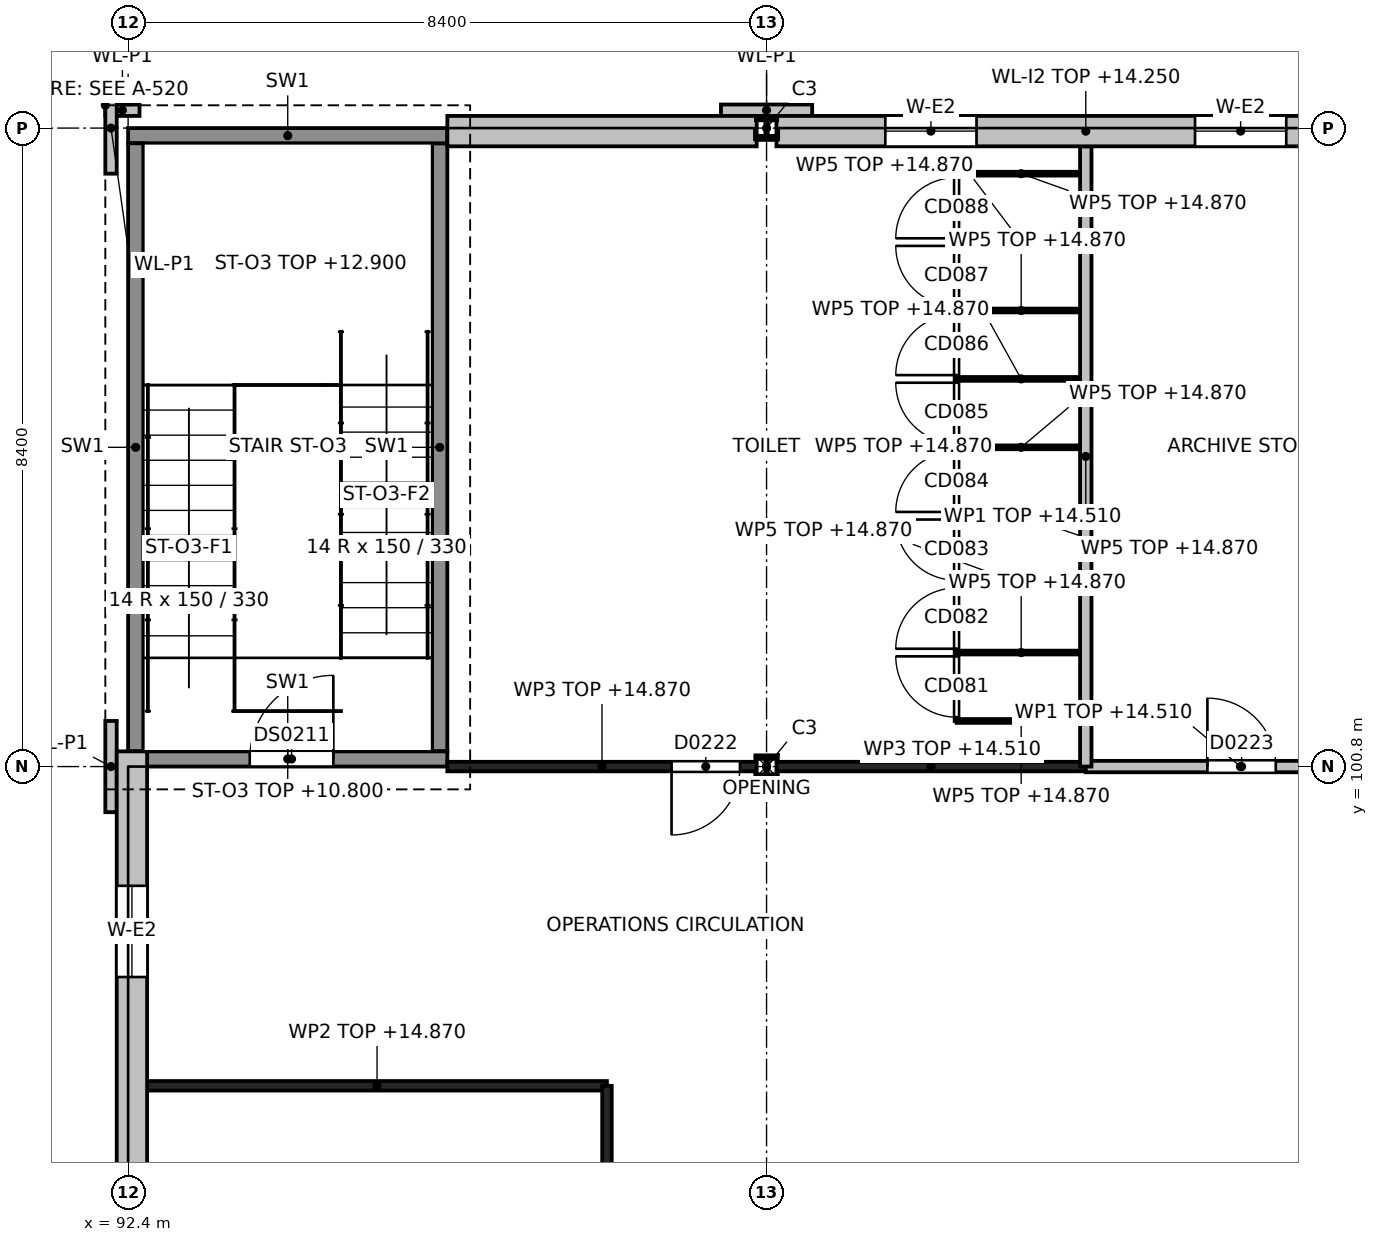
"""IFC4 building model, lengths in metres.
Left out: names, types, materials, properties, quantities, classifications, styles, units other than length and angle.
Written with IfcOpenShell. Run it as: python <this file> out.ifc"""

import sys

from ifc_helpers import new_model, si_unit, direction, frame, frame_2d, origin, origin_2d, place, context, subcontext, project, spatial, rectangle, i_section, extrude, element, fill, save


model = new_model("IFC4")
c1 = context("Model", 3, precision=1e-05, world=origin(), true_north=direction((0.0, 1.0)))
c2 = subcontext(c1, "Body", "Model", "MODEL_VIEW")
j1 = project(units=[si_unit("LENGTHUNIT", "METRE"), si_unit("PLANEANGLEUNIT", "RADIAN")], contexts=[c1])
p1 = place(None, origin())
s1 = spatial("IfcSite", under=j1, at=p1, CompositionType="ELEMENT")
p2 = place(p1, origin())
s2 = spatial("IfcBuilding", under=s1, at=p2, CompositionType="ELEMENT")
p3 = place(p2, frame((0.0, 0.0, 10.8)))
s3 = spatial("IfcBuildingStorey", under=s2, at=p3, CompositionType="ELEMENT", Elevation=10.8)
for number, where, z_axis, x_axis in (
    (1, (100.8, 100.8, 0.0), (0.0, 0.0, 1.0), (1.0, 0.0, 0.0)),
    (2, (100.8, 109.2, 0.0), (0.0, 0.0, 1.0), (1.0, 0.0, 0.0)),
):
    element("IfcColumn", number, at=place(p3, frame(where, z_axis=z_axis, x_axis=x_axis)), inside=s3, PredefinedType="COLUMN", context=c2, shape_type="SweptSolid", body=[
        extrude(i_section(OverallWidth=0.26, OverallDepth=0.26, WebThickness=0.01, FlangeThickness=0.018, at=origin_2d()), origin(), (0.0, 0.0, 1.0), 4.2),
    ])
p4 = place(p3, frame((92.4, 100.9, 0.0), z_axis=(0.0, 0.0, 1.0), x_axis=(1.0, 0.0, 0.0)))
e3 = element("IfcWall", 3, at=p4, inside=s3, PredefinedType="SHEAR", context=c2, shape_type="SweptSolid", body=[
    extrude(rectangle(XDim=4.2, YDim=0.2, at=frame_2d((2.1, 0.0))), origin(), (0.0, 0.0, 1.0), 4.2),
])
p5 = place(p4, frame((1.6, 0.0, 0.0)))
e4 = element("IfcOpeningElement", 4, at=p5, cuts=e3, PredefinedType="OPENING", context=c2, shape_type="SweptSolid", body=[
    extrude(rectangle(XDim=1.1, YDim=2.1, at=frame_2d((0.55, 1.05))), frame((0.0, 0.1, 0.0), z_axis=(0.0, -1.0, 0.0), x_axis=(1.0, 0.0, 0.0)), (0.0, 0.0, 1.0), 0.2),
])
p6 = place(p3, frame((92.4, 109.1, 0.0), z_axis=(0.0, 0.0, 1.0), x_axis=(1.0, 0.0, 0.0)))
e5 = element("IfcWall", 5, at=p6, inside=s3, PredefinedType="SHEAR", context=c2, shape_type="SweptSolid", body=[
    extrude(rectangle(XDim=4.2, YDim=0.2, at=frame_2d((2.1, 0.0))), origin(), (0.0, 0.0, 1.0), 4.2),
])
for number, where, z_axis, x_axis in (
    (6, (92.5, 101.0, 0.0), (0.0, 0.0, 1.0), (0.0, 1.0, 0.0)),
    (7, (96.5, 101.0, 0.0), (0.0, 0.0, 1.0), (0.0, 1.0, 0.0)),
):
    element("IfcWall", number, at=place(p3, frame(where, z_axis=z_axis, x_axis=x_axis)), inside=s3, PredefinedType="SHEAR", context=c2, shape_type="SweptSolid", body=[
        extrude(rectangle(XDim=8.0, YDim=0.2, at=frame_2d((4.0, 0.0))), origin(), (0.0, 0.0, 1.0), 4.2),
    ])
p7 = place(p3, frame((96.6, 109.16, 0.0), z_axis=(0.0, 0.0, 1.0), x_axis=(1.0, 0.0, 0.0)))
e8 = element("IfcWall", 8, at=p7, inside=s3, PredefinedType="SOLIDWALL", context=c2, shape_type="SweptSolid", body=[
    extrude(rectangle(XDim=4.07, YDim=0.4, at=frame_2d((2.035, 0.0))), origin(), (0.0, 0.0, 1.0), 3.45),
])
p8 = place(p3, frame((100.93, 109.16, 0.0), z_axis=(0.0, 0.0, 1.0), x_axis=(1.0, 0.0, 0.0)))
e9 = element("IfcWall", 9, at=p8, inside=s3, PredefinedType="SOLIDWALL", context=c2, shape_type="SweptSolid", body=[
    extrude(rectangle(XDim=8.14, YDim=0.4, at=frame_2d((4.07, 0.0))), origin(), (0.0, 0.0, 1.0), 3.45),
])
p9 = place(p8, frame((1.433, 0.0, 0.9)))
e10 = element("IfcOpeningElement", 10, at=p9, cuts=e9, PredefinedType="OPENING", context=c2, shape_type="SweptSolid", body=[
    extrude(rectangle(XDim=1.2, YDim=2.4, at=frame_2d((0.6, 1.2))), frame((0.0, 0.2, 0.0), z_axis=(0.0, -1.0, 0.0), x_axis=(1.0, 0.0, 0.0)), (0.0, 0.0, 1.0), 0.4),
])
p10 = place(p8, frame((5.508, 0.0, 0.9)))
e11 = element("IfcOpeningElement", 11, at=p10, cuts=e9, PredefinedType="OPENING", context=c2, shape_type="SweptSolid", body=[
    extrude(rectangle(XDim=1.2, YDim=2.4, at=frame_2d((0.6, 1.2))), frame((0.0, 0.2, 0.0), z_axis=(0.0, -1.0, 0.0), x_axis=(1.0, 0.0, 0.0)), (0.0, 0.0, 1.0), 0.4),
])
p11 = place(p3, frame((92.1, 109.435, 0.0), z_axis=(0.0, 0.0, 1.0), x_axis=(1.0, 0.0, 0.0)))
e12 = element("IfcWall", 12, at=p11, inside=s3, PredefinedType="SOLIDWALL", context=c2, shape_type="SweptSolid", body=[
    extrude(rectangle(XDim=0.45, YDim=0.15, at=frame_2d((0.225, 0.0))), origin(), (0.0, 0.0, 1.0), 4.2),
])
p12 = place(p3, frame((100.2, 109.435, 0.0), z_axis=(0.0, 0.0, 1.0), x_axis=(1.0, 0.0, 0.0)))
e13 = element("IfcWall", 13, at=p12, inside=s3, PredefinedType="SOLIDWALL", context=c2, shape_type="SweptSolid", body=[
    extrude(rectangle(XDim=1.2, YDim=0.15, at=frame_2d((0.6, 0.0))), origin(), (0.0, 0.0, 1.0), 4.2),
])
p13 = place(p3, frame((92.45, 92.53, 0.0), z_axis=(0.0, 0.0, 1.0), x_axis=(0.0, 1.0, 0.0)))
e14 = element("IfcWall", 14, at=p13, inside=s3, PredefinedType="SOLIDWALL", context=c2, shape_type="SweptSolid", body=[
    extrude(rectangle(XDim=8.47, YDim=0.4, at=frame_2d((4.235, 0.0))), origin(), (0.0, 0.0, 1.0), 3.45),
])
p14 = place(p13, frame((1.439, 0.0, 0.9)))
e15 = element("IfcOpeningElement", 15, at=p14, cuts=e14, PredefinedType="OPENING", context=c2, shape_type="SweptSolid", body=[
    extrude(rectangle(XDim=1.2, YDim=2.4, at=frame_2d((0.6, 1.2))), frame((0.0, 0.2, 0.0), z_axis=(0.0, -1.0, 0.0), x_axis=(1.0, 0.0, 0.0)), (0.0, 0.0, 1.0), 0.4),
])
p15 = place(p13, frame((5.501, 0.0, 0.9)))
e16 = element("IfcOpeningElement", 16, at=p15, cuts=e14, PredefinedType="OPENING", context=c2, shape_type="SweptSolid", body=[
    extrude(rectangle(XDim=1.2, YDim=2.4, at=frame_2d((0.6, 1.2))), frame((0.0, 0.2, 0.0), z_axis=(0.0, -1.0, 0.0), x_axis=(1.0, 0.0, 0.0)), (0.0, 0.0, 1.0), 0.4),
])
for number, where, z_axis, x_axis in (
    (17, (92.175, 100.2, 0.0), (0.0, 0.0, 1.0), (0.0, 1.0, 0.0)),
    (18, (92.175, 108.6, 0.0), (0.0, 0.0, 1.0), (0.0, 1.0, 0.0)),
):
    element("IfcWall", number, at=place(p3, frame(where, z_axis=z_axis, x_axis=x_axis)), inside=s3, PredefinedType="SOLIDWALL", context=c2, shape_type="SweptSolid", body=[
        extrude(rectangle(XDim=1.2, YDim=0.15, at=frame_2d((0.6, 0.0))), origin(), (0.0, 0.0, 1.0), 4.2),
    ])
p16 = place(p3, frame((92.65, 96.6, 0.0), z_axis=(0.0, 0.0, 1.0), x_axis=(1.0, 0.0, 0.0)))
e19 = element("IfcWall", 19, at=p16, inside=s3, PredefinedType="PARTITIONING", context=c2, shape_type="SweptSolid", body=[
    extrude(rectangle(XDim=6.05, YDim=0.125, at=frame_2d((3.025, 0.0))), origin(), (0.0, 0.0, 1.0), 4.07),
])
p17 = place(p3, frame((96.6, 100.8, 0.0), z_axis=(0.0, 0.0, 1.0), x_axis=(1.0, 0.0, 0.0)))
e20 = element("IfcWall", 20, at=p17, inside=s3, PredefinedType="PARTITIONING", context=c2, shape_type="SweptSolid", body=[
    extrude(rectangle(XDim=4.07, YDim=0.125, at=frame_2d((2.035, 0.0))), origin(), (0.0, 0.0, 1.0), 4.07),
])
p18 = place(p17, frame((2.95, 0.0, 0.0)))
e21 = element("IfcOpeningElement", 21, at=p18, cuts=e20, PredefinedType="OPENING", context=c2, shape_type="SweptSolid", body=[
    extrude(rectangle(XDim=0.9, YDim=2.1, at=frame_2d((0.45, 1.05))), frame((0.0, 0.062, 0.0), z_axis=(0.0, -1.0, 0.0), x_axis=(1.0, 0.0, 0.0)), (0.0, 0.0, 1.0), 0.125),
])
p19 = place(p3, frame((100.93, 100.8, 0.0), z_axis=(0.0, 0.0, 1.0), x_axis=(1.0, 0.0, 0.0)))
e22 = element("IfcWall", 22, at=p19, inside=s3, PredefinedType="PARTITIONING", context=c2, shape_type="SweptSolid", body=[
    extrude(rectangle(XDim=4.07, YDim=0.125, at=frame_2d((2.035, 0.0))), origin(), (0.0, 0.0, 1.0), 3.71),
])
p20 = place(p3, frame((105.0, 100.8, 0.0), z_axis=(0.0, 0.0, 1.0), x_axis=(1.0, 0.0, 0.0)))
e23 = element("IfcWall", 23, at=p20, inside=s3, PredefinedType="PARTITIONING", context=c2, shape_type="SweptSolid", body=[
    extrude(rectangle(XDim=4.07, YDim=0.15, at=frame_2d((2.035, 0.0))), origin(), (0.0, 0.0, 1.0), 3.71),
])
p21 = place(p20, frame((1.6, 0.0, 0.0)))
e24 = element("IfcOpeningElement", 24, at=p21, cuts=e23, PredefinedType="OPENING", context=c2, shape_type="SweptSolid", body=[
    extrude(rectangle(XDim=0.9, YDim=2.1, at=frame_2d((0.45, 1.05))), frame((0.0, 0.075, 0.0), z_axis=(0.0, -1.0, 0.0), x_axis=(1.0, 0.0, 0.0)), (0.0, 0.0, 1.0), 0.15),
])
p22 = place(p3, frame((98.7, 84.0, 0.0), z_axis=(0.0, 0.0, 1.0), x_axis=(0.0, 1.0, 0.0)))
e25 = element("IfcWall", 25, at=p22, inside=s3, PredefinedType="PARTITIONING", context=c2, shape_type="SweptSolid", body=[
    extrude(rectangle(XDim=12.6, YDim=0.125, at=frame_2d((6.3, 0.0))), origin(), (0.0, 0.0, 1.0), 3.71),
])
p23 = place(p3, frame((105.0, 100.8, 0.0), z_axis=(0.0, 0.0, 1.0), x_axis=(0.0, 1.0, 0.0)))
e26 = element("IfcWall", 26, at=p23, inside=s3, PredefinedType="PARTITIONING", context=c2, shape_type="SweptSolid", body=[
    extrude(rectangle(XDim=8.159, YDim=0.15, at=frame_2d((4.08, 0.0))), origin(), (0.0, 0.0, 1.0), 3.71),
])
p24 = place(p3, frame((103.3, 101.4, 0.0), z_axis=(0.0, 0.0, 1.0), x_axis=(0.0, 1.0, 0.0)))
e27 = element("IfcWall", 27, at=p24, inside=s3, PredefinedType="PARTITIONING", context=c2, shape_type="SweptSolid", body=[
    extrude(rectangle(XDim=7.2, YDim=0.05, at=frame_2d((3.6, 0.0))), origin(), (0.0, 0.0, 1.0), 4.07),
])
p25 = place(p24, frame((0.05, 0.0, 0.0)))
e28 = element("IfcOpeningElement", 28, at=p25, cuts=e27, PredefinedType="OPENING", context=c2, shape_type="SweptSolid", body=[
    extrude(rectangle(XDim=0.8, YDim=2.0, at=frame_2d((0.4, 1.0))), frame((0.0, 0.025, 0.0), z_axis=(0.0, -1.0, 0.0), x_axis=(1.0, 0.0, 0.0)), (0.0, 0.0, 1.0), 0.05),
])
p26 = place(p24, frame((0.95, 0.0, 0.0)))
e29 = element("IfcOpeningElement", 29, at=p26, cuts=e27, PredefinedType="OPENING", context=c2, shape_type="SweptSolid", body=[
    extrude(rectangle(XDim=0.8, YDim=2.0, at=frame_2d((0.4, 1.0))), frame((0.0, 0.025, 0.0), z_axis=(0.0, -1.0, 0.0), x_axis=(1.0, 0.0, 0.0)), (0.0, 0.0, 1.0), 0.05),
])
p27 = place(p24, frame((1.85, 0.0, 0.0)))
e30 = element("IfcOpeningElement", 30, at=p27, cuts=e27, PredefinedType="OPENING", context=c2, shape_type="SweptSolid", body=[
    extrude(rectangle(XDim=0.8, YDim=2.0, at=frame_2d((0.4, 1.0))), frame((0.0, 0.025, 0.0), z_axis=(0.0, -1.0, 0.0), x_axis=(1.0, 0.0, 0.0)), (0.0, 0.0, 1.0), 0.05),
])
p28 = place(p24, frame((2.75, 0.0, 0.0)))
e31 = element("IfcOpeningElement", 31, at=p28, cuts=e27, PredefinedType="OPENING", context=c2, shape_type="SweptSolid", body=[
    extrude(rectangle(XDim=0.8, YDim=2.0, at=frame_2d((0.4, 1.0))), frame((0.0, 0.025, 0.0), z_axis=(0.0, -1.0, 0.0), x_axis=(1.0, 0.0, 0.0)), (0.0, 0.0, 1.0), 0.05),
])
p29 = place(p24, frame((3.65, 0.0, 0.0)))
e32 = element("IfcOpeningElement", 32, at=p29, cuts=e27, PredefinedType="OPENING", context=c2, shape_type="SweptSolid", body=[
    extrude(rectangle(XDim=0.8, YDim=2.0, at=frame_2d((0.4, 1.0))), frame((0.0, 0.025, 0.0), z_axis=(0.0, -1.0, 0.0), x_axis=(1.0, 0.0, 0.0)), (0.0, 0.0, 1.0), 0.05),
])
p30 = place(p24, frame((4.55, 0.0, 0.0)))
e33 = element("IfcOpeningElement", 33, at=p30, cuts=e27, PredefinedType="OPENING", context=c2, shape_type="SweptSolid", body=[
    extrude(rectangle(XDim=0.8, YDim=2.0, at=frame_2d((0.4, 1.0))), frame((0.0, 0.025, 0.0), z_axis=(0.0, -1.0, 0.0), x_axis=(1.0, 0.0, 0.0)), (0.0, 0.0, 1.0), 0.05),
])
p31 = place(p24, frame((5.45, 0.0, 0.0)))
e34 = element("IfcOpeningElement", 34, at=p31, cuts=e27, PredefinedType="OPENING", context=c2, shape_type="SweptSolid", body=[
    extrude(rectangle(XDim=0.8, YDim=2.0, at=frame_2d((0.4, 1.0))), frame((0.0, 0.025, 0.0), z_axis=(0.0, -1.0, 0.0), x_axis=(1.0, 0.0, 0.0)), (0.0, 0.0, 1.0), 0.05),
])
p32 = place(p24, frame((6.35, 0.0, 0.0)))
e35 = element("IfcOpeningElement", 35, at=p32, cuts=e27, PredefinedType="OPENING", context=c2, shape_type="SweptSolid", body=[
    extrude(rectangle(XDim=0.8, YDim=2.0, at=frame_2d((0.4, 1.0))), frame((0.0, 0.025, 0.0), z_axis=(0.0, -1.0, 0.0), x_axis=(1.0, 0.0, 0.0)), (0.0, 0.0, 1.0), 0.05),
])
for number, where, z_axis, x_axis in (
    (36, (105.0, 101.4, 0.0), (0.0, 0.0, 1.0), (-1.0, 0.0, 0.0)),
    (37, (105.0, 102.3, 0.0), (0.0, 0.0, 1.0), (-1.0, 0.0, 0.0)),
    (38, (105.0, 103.2, 0.0), (0.0, 0.0, 1.0), (-1.0, 0.0, 0.0)),
    (39, (105.0, 104.1, 0.0), (0.0, 0.0, 1.0), (-1.0, 0.0, 0.0)),
    (40, (105.0, 105.0, 0.0), (0.0, 0.0, 1.0), (-1.0, 0.0, 0.0)),
    (41, (105.0, 105.9, 0.0), (0.0, 0.0, 1.0), (-1.0, 0.0, 0.0)),
    (42, (105.0, 106.8, 0.0), (0.0, 0.0, 1.0), (-1.0, 0.0, 0.0)),
    (43, (105.0, 107.7, 0.0), (0.0, 0.0, 1.0), (-1.0, 0.0, 0.0)),
    (44, (105.0, 108.6, 0.0), (0.0, 0.0, 1.0), (-1.0, 0.0, 0.0)),
):
    element("IfcWall", number, at=place(p3, frame(where, z_axis=z_axis, x_axis=x_axis)), inside=s3, PredefinedType="PARTITIONING", context=c2, shape_type="SweptSolid", body=[
        extrude(rectangle(XDim=1.7, YDim=0.05, at=frame_2d((0.85, 0.0))), origin(), (0.0, 0.0, 1.0), 4.07),
    ])
p33 = place(p9, origin())
e45 = element("IfcWindow", 45, at=p33, inside=s3, PartitioningType="SINGLE_PANEL", PredefinedType="WINDOW", context=c2, shape_type="SweptSolid", body=[
    extrude(rectangle(XDim=1.2, YDim=2.4, at=frame_2d((0.6, 1.2))), frame((0.0, 0.03, 0.0), z_axis=(0.0, -1.0, 0.0), x_axis=(1.0, 0.0, 0.0)), (0.0, 0.0, 1.0), 0.06),
])
fill(e10, e45)
p34 = place(p10, origin())
e46 = element("IfcWindow", 46, at=p34, inside=s3, PartitioningType="SINGLE_PANEL", PredefinedType="WINDOW", context=c2, shape_type="SweptSolid", body=[
    extrude(rectangle(XDim=1.2, YDim=2.4, at=frame_2d((0.6, 1.2))), frame((0.0, 0.03, 0.0), z_axis=(0.0, -1.0, 0.0), x_axis=(1.0, 0.0, 0.0)), (0.0, 0.0, 1.0), 0.06),
])
fill(e11, e46)
p35 = place(p15, origin())
e47 = element("IfcWindow", 47, at=p35, inside=s3, PartitioningType="SINGLE_PANEL", PredefinedType="WINDOW", context=c2, shape_type="SweptSolid", body=[
    extrude(rectangle(XDim=1.2, YDim=2.4, at=frame_2d((0.6, 1.2))), frame((0.0, 0.03, 0.0), z_axis=(0.0, -1.0, 0.0), x_axis=(1.0, 0.0, 0.0)), (0.0, 0.0, 1.0), 0.06),
])
fill(e16, e47)
p36 = place(p18, origin())
e48 = element("IfcDoor", 48, at=p36, inside=s3, OperationType="SINGLE_SWING_LEFT", PredefinedType="DOOR", context=c2, shape_type="SweptSolid", body=[
    extrude(rectangle(XDim=0.9, YDim=2.1, at=frame_2d((0.45, 1.05))), frame((0.0, 0.025, 0.0), z_axis=(0.0, -1.0, 0.0), x_axis=(1.0, 0.0, 0.0)), (0.0, 0.0, 1.0), 0.05),
])
fill(e21, e48)
p37 = place(p21, origin())
e49 = element("IfcDoor", 49, at=p37, inside=s3, OperationType="SINGLE_SWING_LEFT", PredefinedType="DOOR", context=c2, shape_type="SweptSolid", body=[
    extrude(rectangle(XDim=0.9, YDim=2.1, at=frame_2d((0.45, 1.05))), frame((0.0, 0.025, 0.0), z_axis=(0.0, -1.0, 0.0), x_axis=(1.0, 0.0, 0.0)), (0.0, 0.0, 1.0), 0.05),
])
fill(e24, e49)
p38 = place(p5, origin())
e50 = element("IfcDoor", 50, at=p38, inside=s3, OperationType="SINGLE_SWING_RIGHT", PredefinedType="DOOR", context=c2, shape_type="SweptSolid", body=[
    extrude(rectangle(XDim=1.1, YDim=2.1, at=frame_2d((0.55, 1.05))), frame((0.0, 0.025, 0.0), z_axis=(0.0, -1.0, 0.0), x_axis=(1.0, 0.0, 0.0)), (0.0, 0.0, 1.0), 0.05),
])
fill(e4, e50)
p39 = place(p25, origin())
e51 = element("IfcDoor", 51, at=p39, inside=s3, OperationType="SINGLE_SWING_RIGHT", PredefinedType="DOOR", context=c2, shape_type="SweptSolid", body=[
    extrude(rectangle(XDim=0.8, YDim=2.0, at=frame_2d((0.4, 1.0))), frame((0.0, 0.025, 0.0), z_axis=(0.0, -1.0, 0.0), x_axis=(1.0, 0.0, 0.0)), (0.0, 0.0, 1.0), 0.05),
])
fill(e28, e51)
p40 = place(p26, origin())
e52 = element("IfcDoor", 52, at=p40, inside=s3, OperationType="SINGLE_SWING_LEFT", PredefinedType="DOOR", context=c2, shape_type="SweptSolid", body=[
    extrude(rectangle(XDim=0.8, YDim=2.0, at=frame_2d((0.4, 1.0))), frame((0.0, 0.025, 0.0), z_axis=(0.0, -1.0, 0.0), x_axis=(1.0, 0.0, 0.0)), (0.0, 0.0, 1.0), 0.05),
])
fill(e29, e52)
p41 = place(p27, origin())
e53 = element("IfcDoor", 53, at=p41, inside=s3, OperationType="SINGLE_SWING_RIGHT", PredefinedType="DOOR", context=c2, shape_type="SweptSolid", body=[
    extrude(rectangle(XDim=0.8, YDim=2.0, at=frame_2d((0.4, 1.0))), frame((0.0, 0.025, 0.0), z_axis=(0.0, -1.0, 0.0), x_axis=(1.0, 0.0, 0.0)), (0.0, 0.0, 1.0), 0.05),
])
fill(e30, e53)
p42 = place(p28, origin())
e54 = element("IfcDoor", 54, at=p42, inside=s3, OperationType="SINGLE_SWING_LEFT", PredefinedType="DOOR", context=c2, shape_type="SweptSolid", body=[
    extrude(rectangle(XDim=0.8, YDim=2.0, at=frame_2d((0.4, 1.0))), frame((0.0, 0.025, 0.0), z_axis=(0.0, -1.0, 0.0), x_axis=(1.0, 0.0, 0.0)), (0.0, 0.0, 1.0), 0.05),
])
fill(e31, e54)
p43 = place(p29, origin())
e55 = element("IfcDoor", 55, at=p43, inside=s3, OperationType="SINGLE_SWING_RIGHT", PredefinedType="DOOR", context=c2, shape_type="SweptSolid", body=[
    extrude(rectangle(XDim=0.8, YDim=2.0, at=frame_2d((0.4, 1.0))), frame((0.0, 0.025, 0.0), z_axis=(0.0, -1.0, 0.0), x_axis=(1.0, 0.0, 0.0)), (0.0, 0.0, 1.0), 0.05),
])
fill(e32, e55)
p44 = place(p30, origin())
e56 = element("IfcDoor", 56, at=p44, inside=s3, OperationType="SINGLE_SWING_LEFT", PredefinedType="DOOR", context=c2, shape_type="SweptSolid", body=[
    extrude(rectangle(XDim=0.8, YDim=2.0, at=frame_2d((0.4, 1.0))), frame((0.0, 0.025, 0.0), z_axis=(0.0, -1.0, 0.0), x_axis=(1.0, 0.0, 0.0)), (0.0, 0.0, 1.0), 0.05),
])
fill(e33, e56)
p45 = place(p31, origin())
e57 = element("IfcDoor", 57, at=p45, inside=s3, OperationType="SINGLE_SWING_RIGHT", PredefinedType="DOOR", context=c2, shape_type="SweptSolid", body=[
    extrude(rectangle(XDim=0.8, YDim=2.0, at=frame_2d((0.4, 1.0))), frame((0.0, 0.025, 0.0), z_axis=(0.0, -1.0, 0.0), x_axis=(1.0, 0.0, 0.0)), (0.0, 0.0, 1.0), 0.05),
])
fill(e34, e57)
p46 = place(p32, origin())
e58 = element("IfcDoor", 58, at=p46, inside=s3, OperationType="SINGLE_SWING_LEFT", PredefinedType="DOOR", context=c2, shape_type="SweptSolid", body=[
    extrude(rectangle(XDim=0.8, YDim=2.0, at=frame_2d((0.4, 1.0))), frame((0.0, 0.025, 0.0), z_axis=(0.0, -1.0, 0.0), x_axis=(1.0, 0.0, 0.0)), (0.0, 0.0, 1.0), 0.05),
])
fill(e35, e58)
save(model, sys.argv[1])
